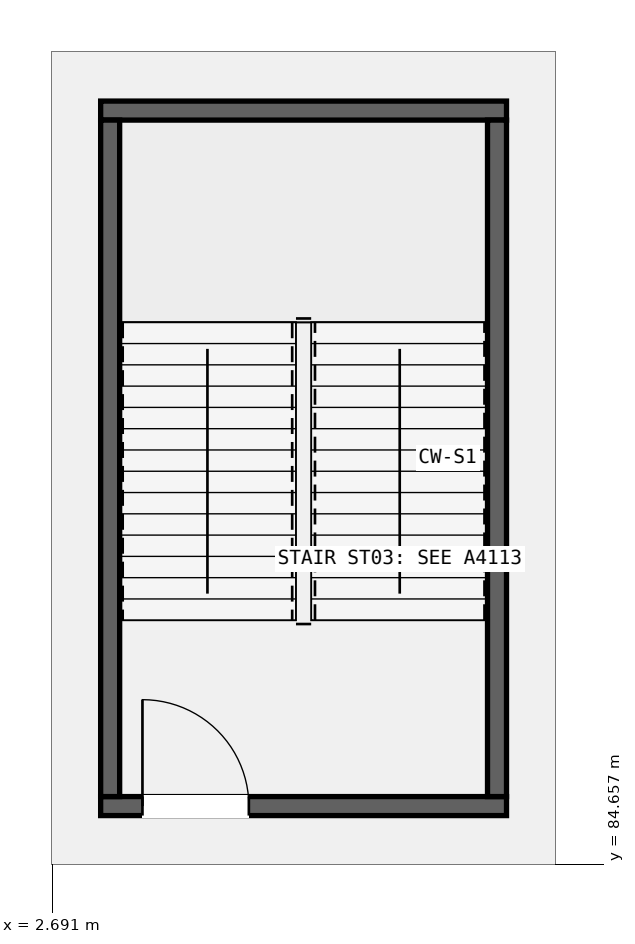
"""IFC4 building model, lengths in metres.
Left out: names, types, materials, properties, quantities, classifications, styles, units other than length and angle.
Written with IfcOpenShell. Run it as: python <this file> out.ifc"""

import sys

from ifc_helpers import new_model, si_unit, direction, frame, frame_2d, origin, place, context, subcontext, project, spatial, rectangle, extrude, element, fill, save


model = new_model("IFC4")
c1 = context("Model", 3, precision=1e-05, world=origin(), true_north=direction((0.0, 1.0)))
c2 = subcontext(c1, "Body", "Model", "MODEL_VIEW")
j1 = project(units=[si_unit("LENGTHUNIT", "METRE"), si_unit("PLANEANGLEUNIT", "RADIAN")], contexts=[c1])
p1 = place(None, origin())
s1 = spatial("IfcSite", under=j1, at=p1, CompositionType="ELEMENT")
p2 = place(p1, origin())
s2 = spatial("IfcBuilding", under=s1, at=p2, CompositionType="ELEMENT")
p3 = place(p2, frame((0.0, 0.0, -4.8)))
s3 = spatial("IfcBuildingStorey", under=s2, at=p3, CompositionType="ELEMENT", Elevation=-4.8)
p4 = place(p3, frame((3.33, 85.425, 0.0), z_axis=(0.0, 0.0, 1.0), x_axis=(1.0, 0.0, 0.0)))
e1 = element("IfcWall", 1, at=p4, inside=s3, PredefinedType="SHEAR", context=c2, shape_type="SweptSolid", body=[
    extrude(rectangle(XDim=5.34, YDim=0.25, at=frame_2d((2.67, 0.0))), origin(), (0.0, 0.0, 1.0), 4.5),
])
p5 = place(p4, frame((0.55, 0.0, 0.0)))
e2 = element("IfcOpeningElement", 2, at=p5, cuts=e1, PredefinedType="OPENING", context=c2, shape_type="SweptSolid", body=[
    extrude(rectangle(XDim=1.4, YDim=2.15, at=frame_2d((0.7, 1.075))), frame((0.0, 0.135, 0.0), z_axis=(0.0, -1.0, 0.0), x_axis=(1.0, 0.0, 0.0)), (0.0, 0.0, 1.0), 0.27),
])
p6 = place(p3, frame((3.33, 94.575, 0.0), z_axis=(0.0, 0.0, 1.0), x_axis=(1.0, 0.0, 0.0)))
e3 = element("IfcWall", 3, at=p6, inside=s3, PredefinedType="SHEAR", context=c2, shape_type="SweptSolid", body=[
    extrude(rectangle(XDim=5.34, YDim=0.25, at=frame_2d((2.67, 0.0))), origin(), (0.0, 0.0, 1.0), 4.5),
])
for number, where, z_axis, x_axis in (
    (4, (3.455, 85.55, 0.0), (0.0, 0.0, 1.0), (0.0, 1.0, 0.0)),
    (5, (8.545, 85.55, 0.0), (0.0, 0.0, 1.0), (0.0, 1.0, 0.0)),
):
    element("IfcWall", number, at=place(p3, frame(where, z_axis=z_axis, x_axis=x_axis)), inside=s3, PredefinedType="SHEAR", context=c2, shape_type="SweptSolid", body=[
        extrude(rectangle(XDim=8.9, YDim=0.25, at=frame_2d((4.45, 0.0))), origin(), (0.0, 0.0, 1.0), 4.5),
    ])
p7 = place(p5, origin())
e6 = element("IfcDoor", 6, at=p7, inside=s3, OperationType="SINGLE_SWING_LEFT", PredefinedType="DOOR", context=c2, shape_type="SweptSolid", body=[
    extrude(rectangle(XDim=1.4, YDim=2.15, at=frame_2d((0.7, 1.075))), frame((0.0, 0.025, 0.0), z_axis=(0.0, -1.0, 0.0), x_axis=(1.0, 0.0, 0.0)), (0.0, 0.0, 1.0), 0.05),
])
fill(e2, e6)
save(model, sys.argv[1])
